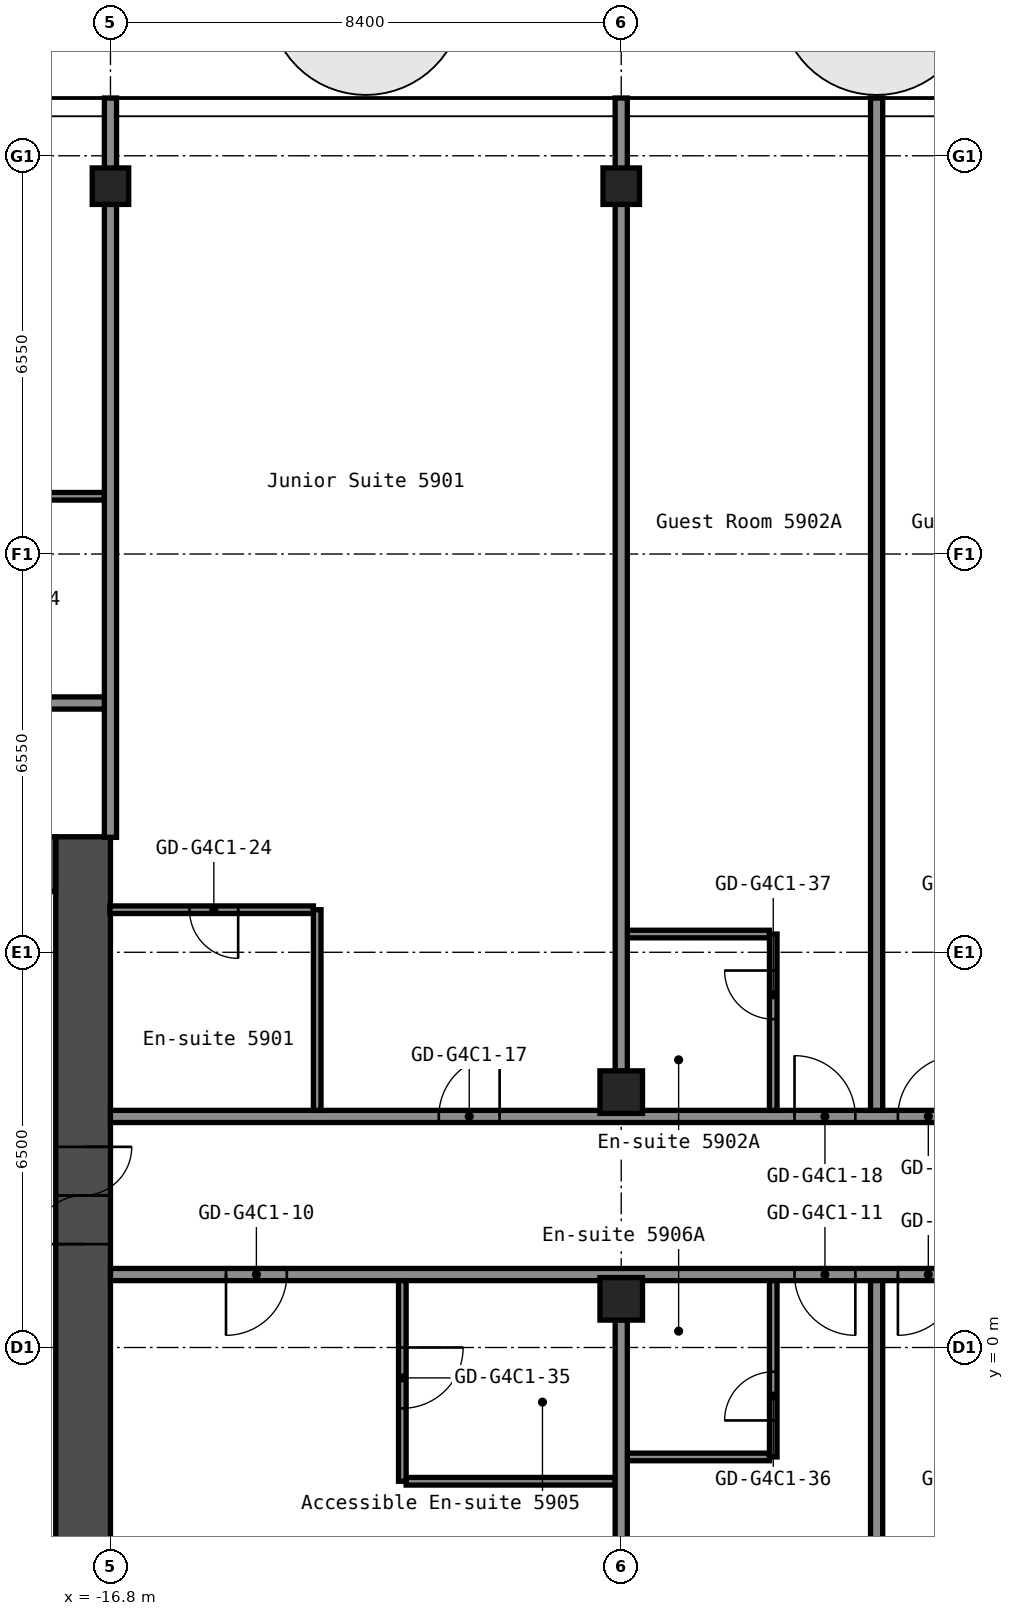
"""IFC4 building model, lengths in metres.
Left out: names, types, materials, properties, quantities, classifications, styles, units other than length and angle.
Written with IfcOpenShell. Run it as: python <this file> out.ifc"""

import sys

from ifc_helpers import new_model, si_unit, direction, frame, frame_2d, origin, origin_2d, place, context, subcontext, project, spatial, rectangle, hollow_rectangle, extrude, element, fill, save


model = new_model("IFC4")
c1 = context("Model", 3, precision=1e-05, world=origin(), true_north=direction((0.0, 1.0)))
c2 = subcontext(c1, "Body", "Model", "MODEL_VIEW")
j1 = project(units=[si_unit("LENGTHUNIT", "METRE"), si_unit("PLANEANGLEUNIT", "RADIAN")], contexts=[c1])
p1 = place(None, origin())
s1 = spatial("IfcSite", under=j1, at=p1, CompositionType="ELEMENT")
p2 = place(p1, origin())
s2 = spatial("IfcBuilding", under=s1, at=p2, CompositionType="ELEMENT")
p3 = place(p2, frame((0.0, 0.0, 209.0)))
s3 = spatial("IfcBuildingStorey", under=s2, at=p3, CompositionType="ELEMENT", Elevation=209.0)
p4 = place(p3, frame((-16.8, 19.1, 0.0), z_axis=(0.0, 0.0, 1.0), x_axis=(1.0, 0.0, 0.0)))
e1 = element("IfcColumn", 1, at=p4, inside=s3, PredefinedType="COLUMN", context=c2, shape_type="SweptSolid", body=[
    extrude(hollow_rectangle(XDim=0.6, YDim=0.6, WallThickness=0.025, InnerFilletRadius=0.038, OuterFilletRadius=0.062, at=origin_2d()), origin(), (0.0, 0.0, 1.0), 2.75),
])
for number, where, z_axis, x_axis in (
    (2, (-8.4, 0.8, 0.0), (0.0, 0.0, 1.0), (1.0, 0.0, 0.0)),
    (3, (-8.4, 4.2, 0.0), (0.0, 0.0, 1.0), (1.0, 0.0, 0.0)),
):
    element("IfcColumn", number, at=place(p3, frame(where, z_axis=z_axis, x_axis=x_axis)), inside=s3, PredefinedType="COLUMN", context=c2, shape_type="SweptSolid", body=[
        extrude(hollow_rectangle(XDim=0.7, YDim=0.7, WallThickness=0.028, at=origin_2d()), origin(), (0.0, 0.0, 1.0), 2.75),
    ])
p5 = place(p3, frame((-8.4, 19.1, 0.0), z_axis=(0.0, 0.0, 1.0), x_axis=(1.0, 0.0, 0.0)))
e4 = element("IfcColumn", 4, at=p5, inside=s3, PredefinedType="COLUMN", context=c2, shape_type="SweptSolid", body=[
    extrude(hollow_rectangle(XDim=0.6, YDim=0.6, WallThickness=0.025, InnerFilletRadius=0.038, OuterFilletRadius=0.062, at=origin_2d()), origin(), (0.0, 0.0, 1.0), 2.75),
])
p6 = place(p3, frame((-17.25, -8.4, 0.0), z_axis=(0.0, 0.0, 1.0), x_axis=(0.0, 1.0, 0.0)))
e5 = element("IfcWall", 5, at=p6, inside=s3, PredefinedType="SHEAR", context=c2, shape_type="SweptSolid", body=[
    extrude(rectangle(XDim=16.8, YDim=0.9, at=frame_2d((8.4, 0.0))), origin(), (0.0, 0.0, 1.0), 2.75),
])
p7 = place(p6, frame((10.1, 0.0, 0.0)))
e6 = element("IfcOpeningElement", 6, at=p7, cuts=e5, PredefinedType="OPENING", context=c2, shape_type="SweptSolid", body=[
    extrude(rectangle(XDim=1.6, YDim=2.1, at=frame_2d((0.8, 1.05))), frame((0.0, 0.46, 0.0), z_axis=(0.0, -1.0, 0.0), x_axis=(1.0, 0.0, 0.0)), (0.0, 0.0, 1.0), 0.92),
])
p8 = place(p3, frame((-32.7, 7.95, 0.0), z_axis=(0.0, 0.0, 1.0), x_axis=(1.0, 0.0, 0.0)))
e7 = element("IfcWall", 7, at=p8, inside=s3, PredefinedType="SHEAR", context=c2, shape_type="SweptSolid", body=[
    extrude(rectangle(XDim=15.0, YDim=0.9, at=frame_2d((7.5, 0.0))), origin(), (0.0, 0.0, 1.0), 2.75),
])
p9 = place(p8, frame((3.4, 0.0, 0.0)))
e8 = element("IfcOpeningElement", 8, at=p9, cuts=e7, PredefinedType="OPENING", context=c2, shape_type="SweptSolid", body=[
    extrude(rectangle(XDim=1.2, YDim=2.1, at=frame_2d((0.6, 1.05))), frame((0.0, 0.46, 0.0), z_axis=(0.0, -1.0, 0.0), x_axis=(1.0, 0.0, 0.0)), (0.0, 0.0, 1.0), 0.92),
])
p10 = place(p8, frame((0.75, 0.0, 0.0)))
e9 = element("IfcOpeningElement", 9, at=p10, cuts=e7, PredefinedType="OPENING", context=c2, shape_type="SweptSolid", body=[
    extrude(rectangle(XDim=0.9, YDim=2.1, at=frame_2d((0.45, 1.05))), frame((0.0, 0.46, 0.0), z_axis=(0.0, -1.0, 0.0), x_axis=(1.0, 0.0, 0.0)), (0.0, 0.0, 1.0), 0.92),
])
p11 = place(p3, frame((-11.938, -2.2, 0.0), z_axis=(0.0, 0.0, 1.0), x_axis=(1.0, 0.0, 0.0)))
e10 = element("IfcWall", 10, at=p11, inside=s3, PredefinedType="PARTITIONING", context=c2, shape_type="SweptSolid", body=[
    extrude(rectangle(XDim=3.438, YDim=0.125, at=frame_2d((1.719, 0.0))), origin(), (0.0, 0.0, 1.0), 2.75),
])
p12 = place(p3, frame((-8.3, -1.8, 0.0), z_axis=(0.0, 0.0, 1.0), x_axis=(1.0, 0.0, 0.0)))
e11 = element("IfcWall", 11, at=p12, inside=s3, PredefinedType="PARTITIONING", context=c2, shape_type="SweptSolid", body=[
    extrude(rectangle(XDim=2.338, YDim=0.125, at=frame_2d((1.169, 0.0))), origin(), (0.0, 0.0, 1.0), 2.75),
])
p13 = place(p3, frame((-16.8, 1.2, 0.0), z_axis=(0.0, 0.0, 1.0), x_axis=(1.0, 0.0, 0.0)))
e12 = element("IfcWall", 12, at=p13, inside=s3, PredefinedType="PARTITIONING", context=c2, shape_type="SweptSolid", body=[
    extrude(rectangle(XDim=33.6, YDim=0.2, at=frame_2d((16.8, 0.0))), origin(), (0.0, 0.0, 1.0), 2.75),
])
p14 = place(p13, frame((1.9, 0.0, 0.0)))
e13 = element("IfcOpeningElement", 13, at=p14, cuts=e12, PredefinedType="OPENING", context=c2, shape_type="SweptSolid", body=[
    extrude(rectangle(XDim=1.0, YDim=2.1, at=frame_2d((0.5, 1.05))), frame((0.0, 0.11, 0.0), z_axis=(0.0, -1.0, 0.0), x_axis=(1.0, 0.0, 0.0)), (0.0, 0.0, 1.0), 0.22),
])
p15 = place(p13, frame((11.25, 0.0, 0.0)))
e14 = element("IfcOpeningElement", 14, at=p15, cuts=e12, PredefinedType="OPENING", context=c2, shape_type="SweptSolid", body=[
    extrude(rectangle(XDim=1.0, YDim=2.1, at=frame_2d((0.5, 1.05))), frame((0.0, 0.11, 0.0), z_axis=(0.0, -1.0, 0.0), x_axis=(1.0, 0.0, 0.0)), (0.0, 0.0, 1.0), 0.22),
])
p16 = place(p13, frame((12.95, 0.0, 0.0)))
e15 = element("IfcOpeningElement", 15, at=p16, cuts=e12, PredefinedType="OPENING", context=c2, shape_type="SweptSolid", body=[
    extrude(rectangle(XDim=1.0, YDim=2.1, at=frame_2d((0.5, 1.05))), frame((0.0, 0.11, 0.0), z_axis=(0.0, -1.0, 0.0), x_axis=(1.0, 0.0, 0.0)), (0.0, 0.0, 1.0), 0.22),
])
p17 = place(p13, frame((19.04, 0.0, 0.0)))
e16 = element("IfcOpeningElement", 16, at=p17, cuts=e12, PredefinedType="OPENING", context=c2, shape_type="SweptSolid", body=[
    extrude(rectangle(XDim=0.9, YDim=2.1, at=frame_2d((0.45, 1.05))), frame((0.0, 0.11, 0.0), z_axis=(0.0, -1.0, 0.0), x_axis=(1.0, 0.0, 0.0)), (0.0, 0.0, 1.0), 0.22),
])
p18 = place(p13, frame((23.24, 0.0, 0.0)))
e17 = element("IfcOpeningElement", 17, at=p18, cuts=e12, PredefinedType="OPENING", context=c2, shape_type="SweptSolid", body=[
    extrude(rectangle(XDim=0.9, YDim=2.1, at=frame_2d((0.45, 1.05))), frame((0.0, 0.11, 0.0), z_axis=(0.0, -1.0, 0.0), x_axis=(1.0, 0.0, 0.0)), (0.0, 0.0, 1.0), 0.22),
])
p19 = place(p13, frame((28.05, 0.0, 0.0)))
e18 = element("IfcOpeningElement", 18, at=p19, cuts=e12, PredefinedType="OPENING", context=c2, shape_type="SweptSolid", body=[
    extrude(rectangle(XDim=1.0, YDim=2.1, at=frame_2d((0.5, 1.05))), frame((0.0, 0.11, 0.0), z_axis=(0.0, -1.0, 0.0), x_axis=(1.0, 0.0, 0.0)), (0.0, 0.0, 1.0), 0.22),
])
p20 = place(p13, frame((29.75, 0.0, 0.0)))
e19 = element("IfcOpeningElement", 19, at=p20, cuts=e12, PredefinedType="OPENING", context=c2, shape_type="SweptSolid", body=[
    extrude(rectangle(XDim=1.0, YDim=2.1, at=frame_2d((0.5, 1.05))), frame((0.0, 0.11, 0.0), z_axis=(0.0, -1.0, 0.0), x_axis=(1.0, 0.0, 0.0)), (0.0, 0.0, 1.0), 0.22),
])
p21 = place(p3, frame((-16.8, 3.8, 0.0), z_axis=(0.0, 0.0, 1.0), x_axis=(1.0, 0.0, 0.0)))
e20 = element("IfcWall", 20, at=p21, inside=s3, PredefinedType="PARTITIONING", context=c2, shape_type="SweptSolid", body=[
    extrude(rectangle(XDim=33.6, YDim=0.2, at=frame_2d((16.8, 0.0))), origin(), (0.0, 0.0, 1.0), 2.75),
])
p22 = place(p21, frame((5.4, 0.0, 0.0)))
e21 = element("IfcOpeningElement", 21, at=p22, cuts=e20, PredefinedType="OPENING", context=c2, shape_type="SweptSolid", body=[
    extrude(rectangle(XDim=1.0, YDim=2.1, at=frame_2d((0.5, 1.05))), frame((0.0, 0.11, 0.0), z_axis=(0.0, -1.0, 0.0), x_axis=(1.0, 0.0, 0.0)), (0.0, 0.0, 1.0), 0.22),
])
p23 = place(p21, frame((11.25, 0.0, 0.0)))
e22 = element("IfcOpeningElement", 22, at=p23, cuts=e20, PredefinedType="OPENING", context=c2, shape_type="SweptSolid", body=[
    extrude(rectangle(XDim=1.0, YDim=2.1, at=frame_2d((0.5, 1.05))), frame((0.0, 0.11, 0.0), z_axis=(0.0, -1.0, 0.0), x_axis=(1.0, 0.0, 0.0)), (0.0, 0.0, 1.0), 0.22),
])
p24 = place(p21, frame((12.95, 0.0, 0.0)))
e23 = element("IfcOpeningElement", 23, at=p24, cuts=e20, PredefinedType="OPENING", context=c2, shape_type="SweptSolid", body=[
    extrude(rectangle(XDim=1.0, YDim=2.1, at=frame_2d((0.5, 1.05))), frame((0.0, 0.11, 0.0), z_axis=(0.0, -1.0, 0.0), x_axis=(1.0, 0.0, 0.0)), (0.0, 0.0, 1.0), 0.22),
])
p25 = place(p21, frame((18.87, 0.0, 0.0)))
e24 = element("IfcOpeningElement", 24, at=p25, cuts=e20, PredefinedType="OPENING", context=c2, shape_type="SweptSolid", body=[
    extrude(rectangle(XDim=0.9, YDim=2.1, at=frame_2d((0.45, 1.05))), frame((0.0, 0.11, 0.0), z_axis=(0.0, -1.0, 0.0), x_axis=(1.0, 0.0, 0.0)), (0.0, 0.0, 1.0), 0.22),
])
p26 = place(p21, frame((23.07, 0.0, 0.0)))
e25 = element("IfcOpeningElement", 25, at=p26, cuts=e20, PredefinedType="OPENING", context=c2, shape_type="SweptSolid", body=[
    extrude(rectangle(XDim=0.9, YDim=2.1, at=frame_2d((0.45, 1.05))), frame((0.0, 0.11, 0.0), z_axis=(0.0, -1.0, 0.0), x_axis=(1.0, 0.0, 0.0)), (0.0, 0.0, 1.0), 0.22),
])
p27 = place(p21, frame((28.05, 0.0, 0.0)))
e26 = element("IfcOpeningElement", 26, at=p27, cuts=e20, PredefinedType="OPENING", context=c2, shape_type="SweptSolid", body=[
    extrude(rectangle(XDim=1.0, YDim=2.1, at=frame_2d((0.5, 1.05))), frame((0.0, 0.11, 0.0), z_axis=(0.0, -1.0, 0.0), x_axis=(1.0, 0.0, 0.0)), (0.0, 0.0, 1.0), 0.22),
])
p28 = place(p21, frame((29.75, 0.0, 0.0)))
e27 = element("IfcOpeningElement", 27, at=p28, cuts=e20, PredefinedType="OPENING", context=c2, shape_type="SweptSolid", body=[
    extrude(rectangle(XDim=1.0, YDim=2.1, at=frame_2d((0.5, 1.05))), frame((0.0, 0.11, 0.0), z_axis=(0.0, -1.0, 0.0), x_axis=(1.0, 0.0, 0.0)), (0.0, 0.0, 1.0), 0.22),
])
p29 = place(p3, frame((-8.3, 6.8, 0.0), z_axis=(0.0, 0.0, 1.0), x_axis=(1.0, 0.0, 0.0)))
e28 = element("IfcWall", 28, at=p29, inside=s3, PredefinedType="PARTITIONING", context=c2, shape_type="SweptSolid", body=[
    extrude(rectangle(XDim=2.338, YDim=0.125, at=frame_2d((1.169, 0.0))), origin(), (0.0, 0.0, 1.0), 2.75),
])
p30 = place(p3, frame((-16.81, 7.2, 0.0), z_axis=(0.0, 0.0, 1.0), x_axis=(1.0, 0.0, 0.0)))
e29 = element("IfcWall", 29, at=p30, inside=s3, PredefinedType="PARTITIONING", context=c2, shape_type="SweptSolid", body=[
    extrude(rectangle(XDim=3.348, YDim=0.125, at=frame_2d((1.674, 0.0))), origin(), (0.0, 0.0, 1.0), 2.75),
])
p31 = place(p30, frame((1.31, 0.0, 0.0)))
e30 = element("IfcOpeningElement", 30, at=p31, cuts=e29, PredefinedType="OPENING", context=c2, shape_type="SweptSolid", body=[
    extrude(rectangle(XDim=0.8, YDim=2.1, at=frame_2d((0.4, 1.05))), frame((0.0, 0.073, 0.0), z_axis=(0.0, -1.0, 0.0), x_axis=(1.0, 0.0, 0.0)), (0.0, 0.0, 1.0), 0.145),
])
p32 = place(p3, frame((-38.1, 10.6, 0.0), z_axis=(0.0, 0.0, 1.0), x_axis=(1.0, 0.0, 0.0)))
e31 = element("IfcWall", 31, at=p32, inside=s3, PredefinedType="PARTITIONING", context=c2, shape_type="SweptSolid", body=[
    extrude(rectangle(XDim=21.3, YDim=0.2, at=frame_2d((10.65, 0.0))), origin(), (0.0, 0.0, 1.0), 2.75),
])
p33 = place(p32, frame((1.95, 0.0, 0.0)))
e32 = element("IfcOpeningElement", 32, at=p33, cuts=e31, PredefinedType="OPENING", context=c2, shape_type="SweptSolid", body=[
    extrude(rectangle(XDim=0.9, YDim=2.1, at=frame_2d((0.45, 1.05))), frame((0.0, 0.11, 0.0), z_axis=(0.0, -1.0, 0.0), x_axis=(1.0, 0.0, 0.0)), (0.0, 0.0, 1.0), 0.22),
])
p34 = place(p32, frame((9.9, 0.0, 0.0)))
e33 = element("IfcOpeningElement", 33, at=p34, cuts=e31, PredefinedType="OPENING", context=c2, shape_type="SweptSolid", body=[
    extrude(rectangle(XDim=1.0, YDim=2.1, at=frame_2d((0.5, 1.05))), frame((0.0, 0.11, 0.0), z_axis=(0.0, -1.0, 0.0), x_axis=(1.0, 0.0, 0.0)), (0.0, 0.0, 1.0), 0.22),
])
p35 = place(p32, frame((14.8, 0.0, 0.0)))
e34 = element("IfcOpeningElement", 34, at=p35, cuts=e31, PredefinedType="OPENING", context=c2, shape_type="SweptSolid", body=[
    extrude(rectangle(XDim=1.0, YDim=2.1, at=frame_2d((0.5, 1.05))), frame((0.0, 0.11, 0.0), z_axis=(0.0, -1.0, 0.0), x_axis=(1.0, 0.0, 0.0)), (0.0, 0.0, 1.0), 0.22),
])
p36 = place(p3, frame((-20.337, 14.0, 0.0), z_axis=(0.0, 0.0, 1.0), x_axis=(1.0, 0.0, 0.0)))
e35 = element("IfcWall", 35, at=p36, inside=s3, PredefinedType="PARTITIONING", context=c2, shape_type="SweptSolid", body=[
    extrude(rectangle(XDim=3.438, YDim=0.125, at=frame_2d((1.719, 0.0))), origin(), (0.0, 0.0, 1.0), 2.75),
])
p37 = place(p3, frame((-16.8, 8.39, 0.0), z_axis=(0.0, 0.0, 1.0), x_axis=(0.0, 1.0, 0.0)))
e36 = element("IfcWall", 36, at=p37, inside=s3, PredefinedType="PARTITIONING", context=c2, shape_type="SweptSolid", body=[
    extrude(rectangle(XDim=12.16, YDim=0.2, at=frame_2d((6.08, 0.0))), origin(), (0.0, 0.0, 1.0), 2.75),
])
p38 = place(p3, frame((-13.4, 3.9, 0.0), z_axis=(0.0, 0.0, 1.0), x_axis=(0.0, 1.0, 0.0)))
e37 = element("IfcWall", 37, at=p38, inside=s3, PredefinedType="PARTITIONING", context=c2, shape_type="SweptSolid", body=[
    extrude(rectangle(XDim=3.3, YDim=0.125, at=frame_2d((1.65, 0.0))), origin(), (0.0, 0.0, 1.0), 2.75),
])
p39 = place(p3, frame((-12.0, -2.2, 0.0), z_axis=(0.0, 0.0, 1.0), x_axis=(0.0, 1.0, 0.0)))
e38 = element("IfcWall", 38, at=p39, inside=s3, PredefinedType="PARTITIONING", context=c2, shape_type="SweptSolid", body=[
    extrude(rectangle(XDim=3.3, YDim=0.125, at=frame_2d((1.65, 0.0))), origin(), (0.0, 0.0, 1.0), 2.75),
])
p40 = place(p39, frame((1.2, 0.0, 0.0)))
e39 = element("IfcOpeningElement", 39, at=p40, cuts=e38, PredefinedType="OPENING", context=c2, shape_type="SweptSolid", body=[
    extrude(rectangle(XDim=1.0, YDim=2.1, at=frame_2d((0.5, 1.05))), frame((0.0, 0.073, 0.0), z_axis=(0.0, -1.0, 0.0), x_axis=(1.0, 0.0, 0.0)), (0.0, 0.0, 1.0), 0.145),
])
for number, where, z_axis, x_axis in (
    (40, (-8.4, -15.55, 0.0), (0.0, 0.0, 1.0), (0.0, 1.0, 0.0)),
    (41, (-8.4, 4.54, 0.0), (0.0, 0.0, 1.0), (0.0, 1.0, 0.0)),
):
    element("IfcWall", number, at=place(p3, frame(where, z_axis=z_axis, x_axis=x_axis)), inside=s3, PredefinedType="PARTITIONING", context=c2, shape_type="SweptSolid", body=[
        extrude(rectangle(XDim=16.01, YDim=0.2, at=frame_2d((8.005, 0.0))), origin(), (0.0, 0.0, 1.0), 2.75),
    ])
p41 = place(p3, frame((-5.9, -1.8, 0.0), z_axis=(0.0, 0.0, 1.0), x_axis=(0.0, 1.0, 0.0)))
e42 = element("IfcWall", 42, at=p41, inside=s3, PredefinedType="PARTITIONING", context=c2, shape_type="SweptSolid", body=[
    extrude(rectangle(XDim=2.9, YDim=0.125, at=frame_2d((1.45, 0.0))), origin(), (0.0, 0.0, 1.0), 2.75),
])
p42 = place(p41, frame((0.6, 0.0, 0.0)))
e43 = element("IfcOpeningElement", 43, at=p42, cuts=e42, PredefinedType="OPENING", context=c2, shape_type="SweptSolid", body=[
    extrude(rectangle(XDim=0.8, YDim=2.1, at=frame_2d((0.4, 1.05))), frame((0.0, 0.073, 0.0), z_axis=(0.0, -1.0, 0.0), x_axis=(1.0, 0.0, 0.0)), (0.0, 0.0, 1.0), 0.145),
])
p43 = place(p3, frame((-5.9, 3.9, 0.0), z_axis=(0.0, 0.0, 1.0), x_axis=(0.0, 1.0, 0.0)))
e44 = element("IfcWall", 44, at=p43, inside=s3, PredefinedType="PARTITIONING", context=c2, shape_type="SweptSolid", body=[
    extrude(rectangle(XDim=2.9, YDim=0.125, at=frame_2d((1.45, 0.0))), origin(), (0.0, 0.0, 1.0), 2.75),
])
p44 = place(p43, frame((1.5, 0.0, 0.0)))
e45 = element("IfcOpeningElement", 45, at=p44, cuts=e44, PredefinedType="OPENING", context=c2, shape_type="SweptSolid", body=[
    extrude(rectangle(XDim=0.8, YDim=2.1, at=frame_2d((0.4, 1.05))), frame((0.0, 0.073, 0.0), z_axis=(0.0, -1.0, 0.0), x_axis=(1.0, 0.0, 0.0)), (0.0, 0.0, 1.0), 0.145),
])
for number, where, z_axis, x_axis in (
    (46, (-4.2, -15.55, 0.0), (0.0, 0.0, 1.0), (0.0, 1.0, 0.0)),
    (47, (-4.2, 3.9, 0.0), (0.0, 0.0, 1.0), (0.0, 1.0, 0.0)),
):
    element("IfcWall", number, at=place(p3, frame(where, z_axis=z_axis, x_axis=x_axis)), inside=s3, PredefinedType="PARTITIONING", context=c2, shape_type="SweptSolid", body=[
        extrude(rectangle(XDim=16.65, YDim=0.2, at=frame_2d((8.325, 0.0))), origin(), (0.0, 0.0, 1.0), 2.75),
    ])
p45 = place(p7, origin())
e48 = element("IfcDoor", 48, at=p45, inside=s3, OperationType="DOUBLE_DOOR_SINGLE_SWING", PredefinedType="DOOR", context=c2, shape_type="SweptSolid", body=[
    extrude(rectangle(XDim=1.6, YDim=2.1, at=frame_2d((0.8, 1.05))), frame((0.0, 0.025, 0.0), z_axis=(0.0, -1.0, 0.0), x_axis=(1.0, 0.0, 0.0)), (0.0, 0.0, 1.0), 0.05),
])
fill(e6, e48)
p46 = place(p14, origin())
e49 = element("IfcDoor", 49, at=p46, inside=s3, OperationType="SINGLE_SWING_LEFT", PredefinedType="DOOR", context=c2, shape_type="SweptSolid", body=[
    extrude(rectangle(XDim=1.0, YDim=2.1, at=frame_2d((0.5, 1.05))), frame((0.0, 0.025, 0.0), z_axis=(0.0, -1.0, 0.0), x_axis=(1.0, 0.0, 0.0)), (0.0, 0.0, 1.0), 0.05),
])
fill(e13, e49)
p47 = place(p15, origin())
e50 = element("IfcDoor", 50, at=p47, inside=s3, OperationType="SINGLE_SWING_RIGHT", PredefinedType="DOOR", context=c2, shape_type="SweptSolid", body=[
    extrude(rectangle(XDim=1.0, YDim=2.1, at=frame_2d((0.5, 1.05))), frame((0.0, 0.025, 0.0), z_axis=(0.0, -1.0, 0.0), x_axis=(1.0, 0.0, 0.0)), (0.0, 0.0, 1.0), 0.05),
])
fill(e14, e50)
p48 = place(p16, origin())
e51 = element("IfcDoor", 51, at=p48, inside=s3, OperationType="SINGLE_SWING_LEFT", PredefinedType="DOOR", context=c2, shape_type="SweptSolid", body=[
    extrude(rectangle(XDim=1.0, YDim=2.1, at=frame_2d((0.5, 1.05))), frame((0.0, 0.025, 0.0), z_axis=(0.0, -1.0, 0.0), x_axis=(1.0, 0.0, 0.0)), (0.0, 0.0, 1.0), 0.05),
])
fill(e15, e51)
p49 = place(p22, origin())
e52 = element("IfcDoor", 52, at=p49, inside=s3, OperationType="SINGLE_SWING_LEFT", PredefinedType="DOOR", context=c2, shape_type="SweptSolid", body=[
    extrude(rectangle(XDim=1.0, YDim=2.1, at=frame_2d((0.5, 1.05))), frame((0.0, 0.025, 0.0), z_axis=(0.0, -1.0, 0.0), x_axis=(1.0, 0.0, 0.0)), (0.0, 0.0, 1.0), 0.05),
])
fill(e21, e52)
p50 = place(p23, origin())
e53 = element("IfcDoor", 53, at=p50, inside=s3, OperationType="SINGLE_SWING_RIGHT", PredefinedType="DOOR", context=c2, shape_type="SweptSolid", body=[
    extrude(rectangle(XDim=1.0, YDim=2.1, at=frame_2d((0.5, 1.05))), frame((0.0, 0.025, 0.0), z_axis=(0.0, -1.0, 0.0), x_axis=(1.0, 0.0, 0.0)), (0.0, 0.0, 1.0), 0.05),
])
fill(e22, e53)
p51 = place(p24, origin())
e54 = element("IfcDoor", 54, at=p51, inside=s3, OperationType="SINGLE_SWING_LEFT", PredefinedType="DOOR", context=c2, shape_type="SweptSolid", body=[
    extrude(rectangle(XDim=1.0, YDim=2.1, at=frame_2d((0.5, 1.05))), frame((0.0, 0.025, 0.0), z_axis=(0.0, -1.0, 0.0), x_axis=(1.0, 0.0, 0.0)), (0.0, 0.0, 1.0), 0.05),
])
fill(e23, e54)
p52 = place(p31, origin())
e55 = element("IfcDoor", 55, at=p52, inside=s3, OperationType="SINGLE_SWING_RIGHT", PredefinedType="DOOR", context=c2, shape_type="SweptSolid", body=[
    extrude(rectangle(XDim=0.8, YDim=2.1, at=frame_2d((0.4, 1.05))), frame((0.0, 0.025, 0.0), z_axis=(0.0, -1.0, 0.0), x_axis=(1.0, 0.0, 0.0)), (0.0, 0.0, 1.0), 0.05),
])
fill(e30, e55)
p53 = place(p40, origin())
e56 = element("IfcDoor", 56, at=p53, inside=s3, OperationType="SINGLE_SWING_RIGHT", PredefinedType="DOOR", context=c2, shape_type="SweptSolid", body=[
    extrude(rectangle(XDim=1.0, YDim=2.1, at=frame_2d((0.5, 1.05))), frame((0.0, 0.025, 0.0), z_axis=(0.0, -1.0, 0.0), x_axis=(1.0, 0.0, 0.0)), (0.0, 0.0, 1.0), 0.05),
])
fill(e39, e56)
p54 = place(p42, origin())
e57 = element("IfcDoor", 57, at=p54, inside=s3, OperationType="SINGLE_SWING_RIGHT", PredefinedType="DOOR", context=c2, shape_type="SweptSolid", body=[
    extrude(rectangle(XDim=0.8, YDim=2.1, at=frame_2d((0.4, 1.05))), frame((0.0, 0.025, 0.0), z_axis=(0.0, -1.0, 0.0), x_axis=(1.0, 0.0, 0.0)), (0.0, 0.0, 1.0), 0.05),
])
fill(e43, e57)
p55 = place(p44, origin())
e58 = element("IfcDoor", 58, at=p55, inside=s3, OperationType="SINGLE_SWING_LEFT", PredefinedType="DOOR", context=c2, shape_type="SweptSolid", body=[
    extrude(rectangle(XDim=0.8, YDim=2.1, at=frame_2d((0.4, 1.05))), frame((0.0, 0.025, 0.0), z_axis=(0.0, -1.0, 0.0), x_axis=(1.0, 0.0, 0.0)), (0.0, 0.0, 1.0), 0.05),
])
fill(e45, e58)
save(model, sys.argv[1])
